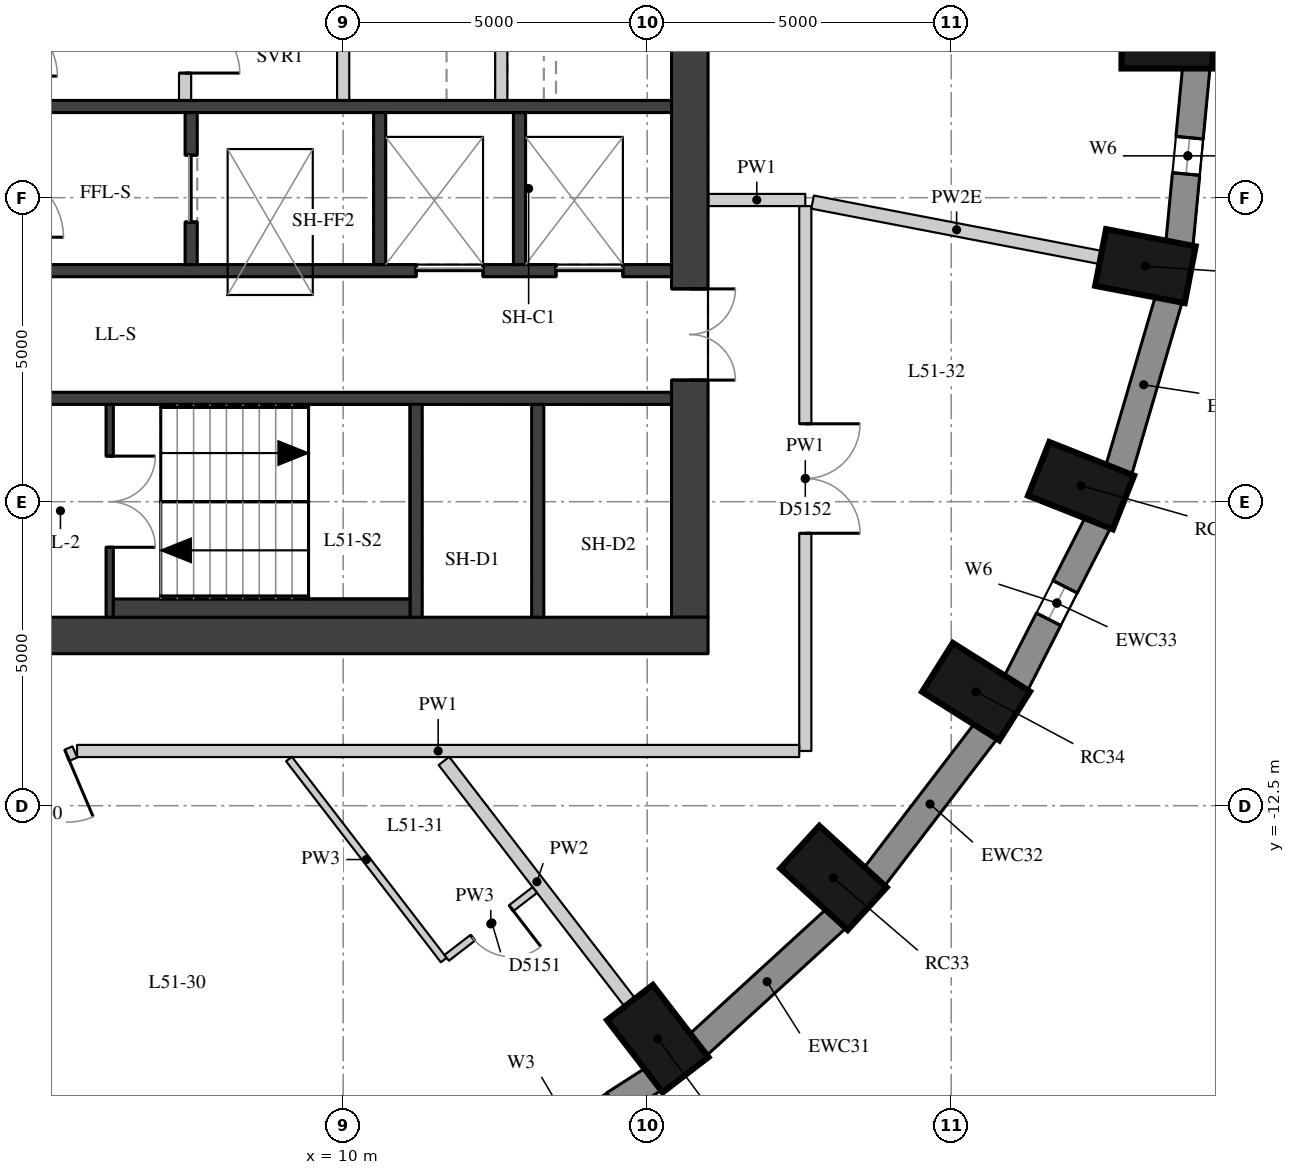
"""IFC4 building model, lengths in metres.
Left out: names, types, materials, properties, quantities, classifications, styles, units other than length and angle.
Written with IfcOpenShell. Run it as: python <this file> out.ifc"""

import sys

from ifc_helpers import new_model, si_unit, direction, frame, frame_2d, origin, origin_2d, place, context, subcontext, project, spatial, rectangle, extrude, element, fill, save


model = new_model("IFC4")
c1 = context("Model", 3, precision=1e-05, world=origin(), true_north=direction((0.0, 1.0)))
c2 = subcontext(c1, "Body", "Model", "MODEL_VIEW")
j1 = project(units=[si_unit("LENGTHUNIT", "METRE"), si_unit("PLANEANGLEUNIT", "RADIAN")], contexts=[c1])
p1 = place(None, origin())
s1 = spatial("IfcSite", under=j1, at=p1, CompositionType="ELEMENT")
p2 = place(p1, origin())
s2 = spatial("IfcBuilding", under=s1, at=p2, CompositionType="ELEMENT")
p3 = place(p2, frame((0.0, 0.0, 181.4)))
s3 = spatial("IfcBuildingStorey", under=s2, at=p3, CompositionType="ELEMENT", Elevation=181.4)
for number, where, z_axis, x_axis in (
    (1, (23.55, 0.1, 0.0), (0.0, 0.0, 1.0), (1.0, 0.0, 0.0)),
    (2, (15.173, -16.332, 0.0), (0.0, 0.0, 1.0), (0.61, -0.792, 0.0)),
    (3, (18.064, -13.688, 0.0), (0.0, 0.0, 1.0), (0.738, -0.675, 0.0)),
    (4, (20.408, -10.625, 0.0), (0.0, 0.0, 1.0), (0.846, -0.533, 0.0)),
    (5, (22.136, -7.236, 0.0), (0.0, 0.0, 1.0), (0.93, -0.369, 0.0)),
    (6, (23.194, -3.625, 0.0), (0.0, 0.0, 1.0), (0.982, -0.189, 0.0)),
):
    element("IfcColumn", number, at=place(p3, frame(where, z_axis=z_axis, x_axis=x_axis)), inside=s3, PredefinedType="COLUMN", context=c2, shape_type="SweptSolid", body=[
        extrude(rectangle(XDim=1.5, YDim=0.95, at=origin_2d()), origin(), (0.0, 0.0, 1.0), 3.3),
    ])
p4 = place(p3, frame((12.455, -18.693, 0.0), z_axis=(0.0, 0.0, 1.0), x_axis=(0.842065914439, 0.539374633943, 0.0)))
e7 = element("IfcWall", 7, at=p4, inside=s3, PredefinedType="SOLIDWALL", context=c2, shape_type="SweptSolid", body=[
    extrude(rectangle(XDim=3.151, YDim=0.45, at=frame_2d((1.576, 0.0))), origin(), (0.0, 0.0, 1.0), 2.85),
])
p5 = place(p4, frame((0.776, 0.0, 0.4)))
e8 = element("IfcOpeningElement", 8, at=p5, cuts=e7, PredefinedType="OPENING", context=c2, shape_type="SweptSolid", body=[
    extrude(rectangle(XDim=1.6, YDim=1.75, at=frame_2d((0.8, 0.875))), frame((0.0, 0.235, 0.0), z_axis=(0.0, -1.0, 0.0), x_axis=(1.0, 0.0, 0.0)), (0.0, 0.0, 1.0), 0.47),
])
p6 = place(p3, frame((15.83, -16.439, 0.0), z_axis=(0.0, 0.0, 1.0), x_axis=(0.737808755941, 0.675009807082, 0.0)))
e9 = element("IfcWall", 9, at=p6, inside=s3, PredefinedType="SOLIDWALL", context=c2, shape_type="SweptSolid", body=[
    extrude(rectangle(XDim=3.094, YDim=0.45, at=frame_2d((1.547, 0.0))), origin(), (0.0, 0.0, 1.0), 2.85),
])
p7 = place(p3, frame((18.728, -13.679, 0.0), z_axis=(0.0, 0.0, 1.0), x_axis=(0.607817056371, 0.794077090706, 0.0)))
e10 = element("IfcWall", 10, at=p7, inside=s3, PredefinedType="SOLIDWALL", context=c2, shape_type="SweptSolid", body=[
    extrude(rectangle(XDim=3.037, YDim=0.45, at=frame_2d((1.519, 0.0))), origin(), (0.0, 0.0, 1.0), 2.85),
])
p8 = place(p3, frame((21.059, -10.497, 0.0), z_axis=(0.0, 0.0, 1.0), x_axis=(0.454133999889, 0.890933392653, 0.0)))
e11 = element("IfcWall", 11, at=p8, inside=s3, PredefinedType="SOLIDWALL", context=c2, shape_type="SweptSolid", body=[
    extrude(rectangle(XDim=2.986, YDim=0.45, at=frame_2d((1.493, 0.0))), origin(), (0.0, 0.0, 1.0), 2.85),
])
p9 = place(p8, frame((1.193, 0.0, 0.4)))
e12 = element("IfcOpeningElement", 12, at=p9, cuts=e11, PredefinedType="OPENING", context=c2, shape_type="SweptSolid", body=[
    extrude(rectangle(XDim=0.6, YDim=1.75, at=frame_2d((0.3, 0.875))), frame((0.0, 0.235, 0.0), z_axis=(0.0, -1.0, 0.0), x_axis=(1.0, 0.0, 0.0)), (0.0, 0.0, 1.0), 0.47),
])
p10 = place(p3, frame((22.751, -6.991, 0.0), z_axis=(0.0, 0.0, 1.0), x_axis=(0.281049481624, 0.959693278542, 0.0)))
e13 = element("IfcWall", 13, at=p10, inside=s3, PredefinedType="SOLIDWALL", context=c2, shape_type="SweptSolid", body=[
    extrude(rectangle(XDim=2.948, YDim=0.45, at=frame_2d((1.474, 0.0))), origin(), (0.0, 0.0, 1.0), 2.85),
])
p11 = place(p3, frame((23.752, -3.269, 0.0), z_axis=(0.0, 0.0, 1.0), x_axis=(0.095257827044, 0.995452633924, 0.0)))
e14 = element("IfcWall", 14, at=p11, inside=s3, PredefinedType="SOLIDWALL", context=c2, shape_type="SweptSolid", body=[
    extrude(rectangle(XDim=2.927, YDim=0.45, at=frame_2d((1.463, 0.0))), origin(), (0.0, 0.0, 1.0), 2.85),
])
p12 = place(p11, frame((1.163, 0.0, 0.4)))
e15 = element("IfcOpeningElement", 15, at=p12, cuts=e14, PredefinedType="OPENING", context=c2, shape_type="SweptSolid", body=[
    extrude(rectangle(XDim=0.6, YDim=1.75, at=frame_2d((0.3, 0.875))), frame((0.0, 0.235, 0.0), z_axis=(0.0, -1.0, 0.0), x_axis=(1.0, 0.0, 0.0)), (0.0, 0.0, 1.0), 0.47),
])
p13 = place(p3, frame((15.7, -9.4, 0.0), z_axis=(0.0, 0.0, 1.0), x_axis=(0.0, 1.0, 0.0)))
e16 = element("IfcWall", 16, at=p13, inside=s3, PredefinedType="SHEAR", context=c2, shape_type="SweptSolid", body=[
    extrude(rectangle(XDim=18.8, YDim=0.6, at=frame_2d((9.4, 0.0))), origin(), (0.0, 0.0, 1.0), 2.85),
])
p14 = place(p13, frame((13.4, 0.0, 0.0)))
e17 = element("IfcOpeningElement", 17, at=p14, cuts=e16, PredefinedType="OPENING", context=c2, shape_type="SweptSolid", body=[
    extrude(rectangle(XDim=1.5, YDim=2.1, at=frame_2d((0.75, 1.05))), frame((0.0, 0.31, 0.0), z_axis=(0.0, -1.0, 0.0), x_axis=(1.0, 0.0, 0.0)), (0.0, 0.0, 1.0), 0.62),
])
p15 = place(p13, frame((3.9, 0.0, 0.0)))
e18 = element("IfcOpeningElement", 18, at=p15, cuts=e16, PredefinedType="OPENING", context=c2, shape_type="SweptSolid", body=[
    extrude(rectangle(XDim=1.5, YDim=2.1, at=frame_2d((0.75, 1.05))), frame((0.0, 0.31, 0.0), z_axis=(0.0, -1.0, 0.0), x_axis=(1.0, 0.0, 0.0)), (0.0, 0.0, 1.0), 0.62),
])
p16 = place(p3, frame((4.0, -9.7, 0.0), z_axis=(0.0, 0.0, 1.0), x_axis=(1.0, 0.0, 0.0)))
e19 = element("IfcWall", 19, at=p16, inside=s3, PredefinedType="SHEAR", context=c2, shape_type="SweptSolid", body=[
    extrude(rectangle(XDim=12.0, YDim=0.6, at=frame_2d((6.0, 0.0))), origin(), (0.0, 0.0, 1.0), 2.85),
])
p17 = place(p3, frame((4.6, -1.0, 0.0), z_axis=(0.0, 0.0, 1.0), x_axis=(1.0, 0.0, 0.0)))
e20 = element("IfcWall", 20, at=p17, inside=s3, PredefinedType="SHEAR", context=c2, shape_type="SweptSolid", body=[
    extrude(rectangle(XDim=10.8, YDim=0.2, at=frame_2d((5.4, 0.0))), origin(), (0.0, 0.0, 1.0), 2.85),
])
p18 = place(p3, frame((4.6, -3.7, 0.0), z_axis=(0.0, 0.0, 1.0), x_axis=(1.0, 0.0, 0.0)))
e21 = element("IfcWall", 21, at=p18, inside=s3, PredefinedType="SHEAR", context=c2, shape_type="SweptSolid", body=[
    extrude(rectangle(XDim=10.8, YDim=0.2, at=frame_2d((5.4, 0.0))), origin(), (0.0, 0.0, 1.0), 2.85),
])
p19 = place(p18, frame((6.6, 0.0, 0.0)))
e22 = element("IfcOpeningElement", 22, at=p19, cuts=e21, PredefinedType="OPENING", context=c2, shape_type="SweptSolid", body=[
    extrude(rectangle(XDim=1.1, YDim=2.1, at=frame_2d((0.55, 1.05))), frame((0.0, 0.11, 0.0), z_axis=(0.0, -1.0, 0.0), x_axis=(1.0, 0.0, 0.0)), (0.0, 0.0, 1.0), 0.22),
])
p20 = place(p18, frame((8.9, 0.0, 0.0)))
e23 = element("IfcOpeningElement", 23, at=p20, cuts=e21, PredefinedType="OPENING", context=c2, shape_type="SweptSolid", body=[
    extrude(rectangle(XDim=1.1, YDim=2.1, at=frame_2d((0.55, 1.05))), frame((0.0, 0.11, 0.0), z_axis=(0.0, -1.0, 0.0), x_axis=(1.0, 0.0, 0.0)), (0.0, 0.0, 1.0), 0.22),
])
p21 = place(p3, frame((4.6, -5.8, 0.0), z_axis=(0.0, 0.0, 1.0), x_axis=(1.0, 0.0, 0.0)))
e24 = element("IfcWall", 24, at=p21, inside=s3, PredefinedType="SHEAR", context=c2, shape_type="SweptSolid", body=[
    extrude(rectangle(XDim=10.8, YDim=0.2, at=frame_2d((5.4, 0.0))), origin(), (0.0, 0.0, 1.0), 2.85),
])
for number, where, z_axis, x_axis in (
    (25, (11.2, -9.4, 0.0), (0.0, 0.0, 1.0), (0.0, 1.0, 0.0)),
    (26, (13.2, -9.4, 0.0), (0.0, 0.0, 1.0), (0.0, 1.0, 0.0)),
):
    element("IfcWall", number, at=place(p3, frame(where, z_axis=z_axis, x_axis=x_axis)), inside=s3, PredefinedType="SHEAR", context=c2, shape_type="SweptSolid", body=[
        extrude(rectangle(XDim=3.5, YDim=0.2, at=frame_2d((1.75, 0.0))), origin(), (0.0, 0.0, 1.0), 2.85),
    ])
p22 = place(p3, frame((7.5, -3.6, 0.0), z_axis=(0.0, 0.0, 1.0), x_axis=(0.0, 1.0, 0.0)))
e27 = element("IfcWall", 27, at=p22, inside=s3, PredefinedType="SHEAR", context=c2, shape_type="SweptSolid", body=[
    extrude(rectangle(XDim=2.5, YDim=0.2, at=frame_2d((1.25, 0.0))), origin(), (0.0, 0.0, 1.0), 2.85),
])
p23 = place(p22, frame((0.7, 0.0, 0.0)))
e28 = element("IfcOpeningElement", 28, at=p23, cuts=e27, PredefinedType="OPENING", context=c2, shape_type="SweptSolid", body=[
    extrude(rectangle(XDim=1.1, YDim=2.1, at=frame_2d((0.55, 1.05))), frame((0.0, 0.11, 0.0), z_axis=(0.0, -1.0, 0.0), x_axis=(1.0, 0.0, 0.0)), (0.0, 0.0, 1.0), 0.22),
])
for number, where, z_axis, x_axis in (
    (29, (10.6, -3.6, 0.0), (0.0, 0.0, 1.0), (0.0, 1.0, 0.0)),
    (30, (12.9, -3.6, 0.0), (0.0, 0.0, 1.0), (0.0, 1.0, 0.0)),
):
    element("IfcWall", number, at=place(p3, frame(where, z_axis=z_axis, x_axis=x_axis)), inside=s3, PredefinedType="SHEAR", context=c2, shape_type="SweptSolid", body=[
        extrude(rectangle(XDim=2.5, YDim=0.2, at=frame_2d((1.25, 0.0))), origin(), (0.0, 0.0, 1.0), 2.85),
    ])
p24 = place(p3, frame((6.16, -9.4, 0.0), z_axis=(0.0, 0.0, 1.0), x_axis=(0.0, 1.0, 0.0)))
e31 = element("IfcWall", 31, at=p24, inside=s3, PredefinedType="SHEAR", context=c2, shape_type="SweptSolid", body=[
    extrude(rectangle(XDim=3.5, YDim=0.12, at=frame_2d((1.75, 0.0))), origin(), (0.0, 0.0, 1.0), 2.85),
])
p25 = place(p24, frame((1.15, 0.0, 0.0)))
e32 = element("IfcOpeningElement", 32, at=p25, cuts=e31, PredefinedType="OPENING", context=c2, shape_type="SweptSolid", body=[
    extrude(rectangle(XDim=1.5, YDim=2.1, at=frame_2d((0.75, 1.05))), frame((0.0, 0.07, 0.0), z_axis=(0.0, -1.0, 0.0), x_axis=(1.0, 0.0, 0.0)), (0.0, 0.0, 1.0), 0.14),
])
p26 = place(p3, frame((7.4, -0.9, 0.0), z_axis=(0.0, 0.0, 1.0), x_axis=(0.0, 1.0, 0.0)))
e33 = element("IfcWall", 33, at=p26, inside=s3, PredefinedType="PARTITIONING", context=c2, shape_type="SweptSolid", body=[
    extrude(rectangle(XDim=1.8, YDim=0.2, at=frame_2d((0.9, 0.0))), origin(), (0.0, 0.0, 1.0), 2.85),
])
p27 = place(p26, frame((0.45, 0.0, 0.0)))
e34 = element("IfcOpeningElement", 34, at=p27, cuts=e33, PredefinedType="OPENING", context=c2, shape_type="SweptSolid", body=[
    extrude(rectangle(XDim=0.9, YDim=2.1, at=frame_2d((0.45, 1.05))), frame((0.0, 0.11, 0.0), z_axis=(0.0, -1.0, 0.0), x_axis=(1.0, 0.0, 0.0)), (0.0, 0.0, 1.0), 0.22),
])
for number, where, z_axis, x_axis in (
    (35, (10.0, -0.9, 0.0), (0.0, 0.0, 1.0), (0.0, 1.0, 0.0)),
    (36, (12.6, -0.9, 0.0), (0.0, 0.0, 1.0), (0.0, 1.0, 0.0)),
):
    element("IfcWall", number, at=place(p3, frame(where, z_axis=z_axis, x_axis=x_axis)), inside=s3, PredefinedType="PARTITIONING", context=c2, shape_type="SweptSolid", body=[
        extrude(rectangle(XDim=1.8, YDim=0.2, at=frame_2d((0.9, 0.0))), origin(), (0.0, 0.0, 1.0), 2.85),
    ])
p28 = place(p3, frame((6.22, -9.25, 0.0), z_axis=(0.0, 0.0, 1.0), x_axis=(1.0, 0.0, 0.0)))
e37 = element("IfcWall", 37, at=p28, inside=s3, PredefinedType="PARTITIONING", context=c2, shape_type="SweptSolid", body=[
    extrude(rectangle(XDim=4.88, YDim=0.3, at=frame_2d((2.44, 0.0))), origin(), (0.0, 0.0, 1.0), 2.85),
])
p29 = place(p3, frame((16.004, -2.538, 0.0), z_axis=(0.0, 0.0, 1.0), x_axis=(1.0, 0.0, 0.0)))
e38 = element("IfcWall", 38, at=p29, inside=s3, PredefinedType="PARTITIONING", context=c2, shape_type="SweptSolid", body=[
    extrude(rectangle(XDim=1.596, YDim=0.2, at=frame_2d((0.798, 0.0))), origin(), (0.0, 0.0, 1.0), 2.85),
])
p30 = place(p3, frame((17.6, -2.638, 0.0), z_axis=(0.0, 0.0, 1.0), x_axis=(0.0, -1.0, 0.0)))
e39 = element("IfcWall", 39, at=p30, inside=s3, PredefinedType="PARTITIONING", context=c2, shape_type="SweptSolid", body=[
    extrude(rectangle(XDim=8.962, YDim=0.2, at=frame_2d((4.481, 0.0))), origin(), (0.0, 0.0, 1.0), 2.85),
])
p31 = place(p30, frame((3.581, 0.0, 0.0)))
e40 = element("IfcOpeningElement", 40, at=p31, cuts=e39, PredefinedType="OPENING", context=c2, shape_type="SweptSolid", body=[
    extrude(rectangle(XDim=1.8, YDim=2.1, at=frame_2d((0.9, 1.05))), frame((0.0, 0.11, 0.0), z_axis=(0.0, -1.0, 0.0), x_axis=(1.0, 0.0, 0.0)), (0.0, 0.0, 1.0), 0.22),
])
p32 = place(p3, frame((17.5, -11.6, 0.0), z_axis=(0.0, 0.0, 1.0), x_axis=(-1.0, 0.0, 0.0)))
e41 = element("IfcWall", 41, at=p32, inside=s3, PredefinedType="PARTITIONING", context=c2, shape_type="SweptSolid", body=[
    extrude(rectangle(XDim=11.876, YDim=0.2, at=frame_2d((5.938, 0.0))), origin(), (0.0, 0.0, 1.0), 2.85),
])
p33 = place(p3, frame((5.587, -11.616, 0.0), z_axis=(0.0, 0.0, 1.0), x_axis=(-0.920312454828, -0.391184081334, 0.0)))
e42 = element("IfcWall", 42, at=p33, inside=s3, PredefinedType="PARTITIONING", context=c2, shape_type="SweptSolid", body=[
    extrude(rectangle(XDim=2.975, YDim=0.2, at=frame_2d((1.488, 0.0))), origin(), (0.0, 0.0, 1.0), 2.85),
])
p34 = place(p33, frame((0.14, 0.0, 0.0)))
e43 = element("IfcOpeningElement", 43, at=p34, cuts=e42, PredefinedType="OPENING", context=c2, shape_type="SweptSolid", body=[
    extrude(rectangle(XDim=1.1, YDim=2.1, at=frame_2d((0.55, 1.05))), frame((0.0, 0.11, 0.0), z_axis=(0.0, -1.0, 0.0), x_axis=(1.0, 0.0, 0.0)), (0.0, 0.0, 1.0), 0.22),
])
p35 = place(p3, frame((14.716, -15.737, 0.0), z_axis=(0.0, 0.0, 1.0), x_axis=(-0.609986007715, 0.792412184657, 0.0)))
e44 = element("IfcWall", 44, at=p35, inside=s3, PredefinedType="PARTITIONING", context=c2, shape_type="SweptSolid", body=[
    extrude(rectangle(XDim=5.015, YDim=0.22, at=frame_2d((2.507, 0.0))), origin(), (0.0, 0.0, 1.0), 2.85),
])
p36 = place(p3, frame((22.457, -3.483, 0.0), z_axis=(0.0, 0.0, 1.0), x_axis=(-0.982022686577, 0.188762928159, 0.0)))
e45 = element("IfcWall", 45, at=p36, inside=s3, PredefinedType="PARTITIONING", context=c2, shape_type="SweptSolid", body=[
    extrude(rectangle(XDim=4.824, YDim=0.22, at=frame_2d((2.412, 0.0))), origin(), (0.0, 0.0, 1.0), 2.4),
])
p37 = place(p3, frame((9.109, -11.732, 0.0), z_axis=(0.0, 0.0, 1.0), x_axis=(0.609996270026, -0.79240428479, 0.0)))
e46 = element("IfcWall", 46, at=p37, inside=s3, PredefinedType="PARTITIONING", context=c2, shape_type="SweptSolid", body=[
    extrude(rectangle(XDim=4.173, YDim=0.12, at=frame_2d((2.087, 0.0))), origin(), (0.0, 0.0, 1.0), 2.85),
])
p38 = place(p3, frame((11.702, -15.002, 0.0), z_axis=(0.0, 0.0, 1.0), x_axis=(0.792395776304, 0.610007322657, 0.0)))
e47 = element("IfcWall", 47, at=p38, inside=s3, PredefinedType="PARTITIONING", context=c2, shape_type="SweptSolid", body=[
    extrude(rectangle(XDim=1.83, YDim=0.12, at=frame_2d((0.915, 0.0))), origin(), (0.0, 0.0, 1.0), 2.85),
])
p39 = place(p38, frame((0.54, 0.0, 0.0)))
e48 = element("IfcOpeningElement", 48, at=p39, cuts=e47, PredefinedType="OPENING", context=c2, shape_type="SweptSolid", body=[
    extrude(rectangle(XDim=0.8, YDim=2.1, at=frame_2d((0.4, 1.05))), frame((0.0, 0.07, 0.0), z_axis=(0.0, -1.0, 0.0), x_axis=(1.0, 0.0, 0.0)), (0.0, 0.0, 1.0), 0.14),
])
p40 = place(p9, origin())
e49 = element("IfcWindow", 49, at=p40, inside=s3, PartitioningType="SINGLE_PANEL", PredefinedType="WINDOW", context=c2, shape_type="SweptSolid", body=[
    extrude(rectangle(XDim=0.6, YDim=1.75, at=frame_2d((0.3, 0.875))), frame((0.0, 0.035, 0.0), z_axis=(0.0, -1.0, 0.0), x_axis=(1.0, 0.0, 0.0)), (0.0, 0.0, 1.0), 0.06),
])
fill(e12, e49)
p41 = place(p12, origin())
e50 = element("IfcWindow", 50, at=p41, inside=s3, PartitioningType="SINGLE_PANEL", PredefinedType="WINDOW", context=c2, shape_type="SweptSolid", body=[
    extrude(rectangle(XDim=0.6, YDim=1.75, at=frame_2d((0.3, 0.875))), frame((0.0, 0.035, 0.0), z_axis=(0.0, -1.0, 0.0), x_axis=(1.0, 0.0, 0.0)), (0.0, 0.0, 1.0), 0.06),
])
fill(e15, e50)
p42 = place(p15, origin())
e51 = element("IfcDoor", 51, at=p42, inside=s3, OperationType="DOUBLE_DOOR_SINGLE_SWING", PredefinedType="DOOR", context=c2, shape_type="SweptSolid", body=[
    extrude(rectangle(XDim=1.5, YDim=2.1, at=frame_2d((0.75, 1.05))), frame((0.0, 0.025, 0.0), z_axis=(0.0, -1.0, 0.0), x_axis=(1.0, 0.0, 0.0)), (0.0, 0.0, 1.0), 0.05),
])
fill(e18, e51)
p43 = place(p25, origin())
e52 = element("IfcDoor", 52, at=p43, inside=s3, OperationType="DOUBLE_DOOR_SINGLE_SWING", PredefinedType="DOOR", context=c2, shape_type="SweptSolid", body=[
    extrude(rectangle(XDim=1.5, YDim=2.1, at=frame_2d((0.75, 1.05))), frame((0.0, 0.025, 0.0), z_axis=(0.0, -1.0, 0.0), x_axis=(1.0, 0.0, 0.0)), (0.0, 0.0, 1.0), 0.05),
])
fill(e32, e52)
p44 = place(p19, origin())
e53 = element("IfcDoor", 53, at=p44, inside=s3, OperationType="DOUBLE_DOOR_SLIDING", PredefinedType="DOOR", context=c2, shape_type="SweptSolid", body=[
    extrude(rectangle(XDim=1.1, YDim=2.1, at=frame_2d((0.55, 1.05))), frame((0.0, 0.025, 0.0), z_axis=(0.0, -1.0, 0.0), x_axis=(1.0, 0.0, 0.0)), (0.0, 0.0, 1.0), 0.05),
])
fill(e22, e53)
p45 = place(p20, origin())
e54 = element("IfcDoor", 54, at=p45, inside=s3, OperationType="DOUBLE_DOOR_SLIDING", PredefinedType="DOOR", context=c2, shape_type="SweptSolid", body=[
    extrude(rectangle(XDim=1.1, YDim=2.1, at=frame_2d((0.55, 1.05))), frame((0.0, 0.025, 0.0), z_axis=(0.0, -1.0, 0.0), x_axis=(1.0, 0.0, 0.0)), (0.0, 0.0, 1.0), 0.05),
])
fill(e23, e54)
p46 = place(p23, origin())
e55 = element("IfcDoor", 55, at=p46, inside=s3, OperationType="DOUBLE_DOOR_SLIDING", PredefinedType="DOOR", context=c2, shape_type="SweptSolid", body=[
    extrude(rectangle(XDim=1.1, YDim=2.1, at=frame_2d((0.55, 1.05))), frame((0.0, 0.025, 0.0), z_axis=(0.0, -1.0, 0.0), x_axis=(1.0, 0.0, 0.0)), (0.0, 0.0, 1.0), 0.05),
])
fill(e28, e55)
p47 = place(p27, origin())
e56 = element("IfcDoor", 56, at=p47, inside=s3, OperationType="SINGLE_SWING_RIGHT", PredefinedType="DOOR", context=c2, shape_type="SweptSolid", body=[
    extrude(rectangle(XDim=0.9, YDim=2.1, at=frame_2d((0.45, 1.05))), frame((0.0, 0.025, 0.0), z_axis=(0.0, -1.0, 0.0), x_axis=(1.0, 0.0, 0.0)), (0.0, 0.0, 1.0), 0.05),
])
fill(e34, e56)
p48 = place(p34, origin())
e57 = element("IfcDoor", 57, at=p48, inside=s3, OperationType="SINGLE_SWING_LEFT", PredefinedType="DOOR", context=c2, shape_type="SweptSolid", body=[
    extrude(rectangle(XDim=1.1, YDim=2.1, at=frame_2d((0.55, 1.05))), frame((0.0, 0.025, 0.0), z_axis=(0.0, -1.0, 0.0), x_axis=(1.0, 0.0, 0.0)), (0.0, 0.0, 1.0), 0.05),
])
fill(e43, e57)
p49 = place(p39, origin())
e58 = element("IfcDoor", 58, at=p49, inside=s3, OperationType="SINGLE_SWING_LEFT", PredefinedType="DOOR", context=c2, shape_type="SweptSolid", body=[
    extrude(rectangle(XDim=0.8, YDim=2.1, at=frame_2d((0.4, 1.05))), frame((0.0, 0.025, 0.0), z_axis=(0.0, -1.0, 0.0), x_axis=(1.0, 0.0, 0.0)), (0.0, 0.0, 1.0), 0.05),
])
fill(e48, e58)
p50 = place(p31, origin())
e59 = element("IfcDoor", 59, at=p50, inside=s3, OperationType="DOUBLE_DOOR_SINGLE_SWING", PredefinedType="DOOR", context=c2, shape_type="SweptSolid", body=[
    extrude(rectangle(XDim=1.8, YDim=2.1, at=frame_2d((0.9, 1.05))), frame((0.0, 0.025, 0.0), z_axis=(0.0, -1.0, 0.0), x_axis=(1.0, 0.0, 0.0)), (0.0, 0.0, 1.0), 0.05),
])
fill(e40, e59)
save(model, sys.argv[1])
